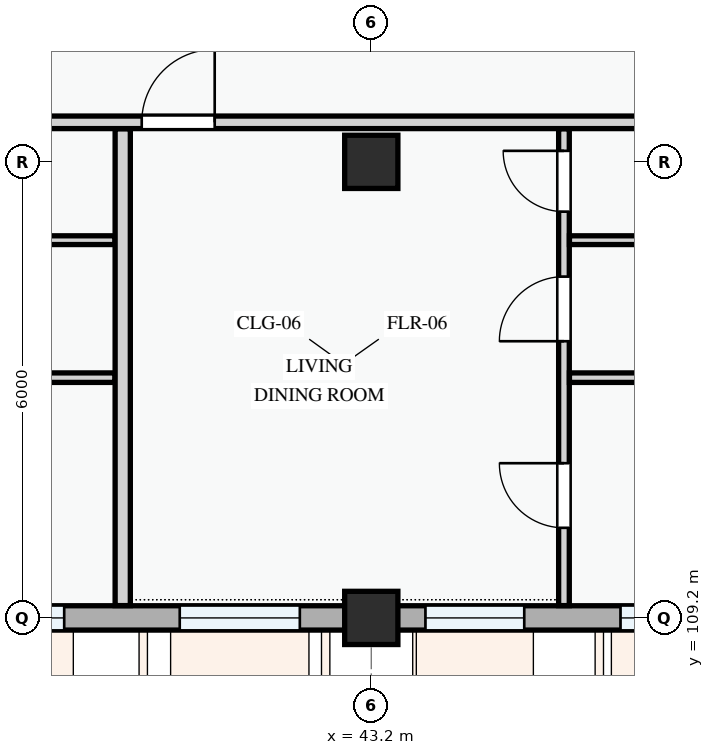
"""IFC4 building model, lengths in metres.
Left out: names, types, materials, properties, quantities, classifications, styles, units other than length and angle.
Written with IfcOpenShell. Run it as: python <this file> out.ifc"""

import sys

from ifc_helpers import new_model, si_unit, direction, frame, frame_2d, origin, origin_2d, place, context, subcontext, project, spatial, rectangle, extrude, element, fill, save


model = new_model("IFC4")
c1 = context("Model", 3, precision=1e-05, world=origin(), true_north=direction((0.0, 1.0)))
c2 = subcontext(c1, "Body", "Model", "MODEL_VIEW")
j1 = project(units=[si_unit("LENGTHUNIT", "METRE"), si_unit("PLANEANGLEUNIT", "RADIAN")], contexts=[c1])
p1 = place(None, origin())
s1 = spatial("IfcSite", under=j1, at=p1, CompositionType="ELEMENT")
p2 = place(p1, origin())
s2 = spatial("IfcBuilding", under=s1, at=p2, CompositionType="ELEMENT")
p3 = place(p2, frame((0.0, 0.0, 21.3)))
s3 = spatial("IfcBuildingStorey", under=s2, at=p3, CompositionType="ELEMENT", Elevation=21.3)
for number, where, z_axis, x_axis in (
    (1, (43.2, 109.2, 0.0), (0.0, 0.0, 1.0), (1.0, 0.0, 0.0)),
    (2, (43.2, 115.2, 0.0), (0.0, 0.0, 1.0), (1.0, 0.0, 0.0)),
):
    element("IfcColumn", number, at=place(p3, frame(where, z_axis=z_axis, x_axis=x_axis)), inside=s3, PredefinedType="COLUMN", context=c2, shape_type="SweptSolid", body=[
        extrude(rectangle(XDim=0.7, YDim=0.7, at=origin_2d()), origin(), (0.0, 0.0, 1.0), 3.3),
    ])
p4 = place(p3, frame((37.2, 109.2, 0.0), z_axis=(0.0, 0.0, 1.0), x_axis=(1.0, 0.0, 0.0)))
e3 = element("IfcWall", 3, at=p4, inside=s3, PredefinedType="STANDARD", context=c2, shape_type="SweptSolid", body=[
    extrude(rectangle(XDim=6.0, YDim=0.32, at=frame_2d((3.0, 0.0))), origin(), (0.0, 0.0, 1.0), 2.475),
])
p5 = place(p4, frame((0.96, 0.0, 0.78)))
e4 = element("IfcOpeningElement", 4, at=p5, cuts=e3, PredefinedType="OPENING", context=c2, shape_type="SweptSolid", body=[
    extrude(rectangle(XDim=1.0, YDim=1.25, at=frame_2d((0.5, 0.625))), frame((0.0, 0.17, 0.0), z_axis=(0.0, -1.0, 0.0), x_axis=(1.0, 0.0, 0.0)), (0.0, 0.0, 1.0), 0.34),
])
p6 = place(p4, frame((3.48, 0.0, 0.78)))
e5 = element("IfcOpeningElement", 5, at=p6, cuts=e3, PredefinedType="OPENING", context=c2, shape_type="SweptSolid", body=[
    extrude(rectangle(XDim=1.58, YDim=1.48, at=frame_2d((0.79, 0.74))), frame((0.0, 0.17, 0.0), z_axis=(0.0, -1.0, 0.0), x_axis=(1.0, 0.0, 0.0)), (0.0, 0.0, 1.0), 0.34),
])
p7 = place(p3, frame((43.2, 109.2, 0.0), z_axis=(0.0, 0.0, 1.0), x_axis=(1.0, 0.0, 0.0)))
e6 = element("IfcWall", 6, at=p7, inside=s3, PredefinedType="STANDARD", context=c2, shape_type="SweptSolid", body=[
    extrude(rectangle(XDim=8.4, YDim=0.32, at=frame_2d((4.2, 0.0))), origin(), (0.0, 0.0, 1.0), 2.375),
])
p8 = place(p7, frame((0.712, 0.0, 0.78)))
e7 = element("IfcOpeningElement", 7, at=p8, cuts=e6, PredefinedType="OPENING", context=c2, shape_type="SweptSolid", body=[
    extrude(rectangle(XDim=1.3, YDim=1.4, at=frame_2d((0.65, 0.7))), frame((0.0, 0.17, 0.0), z_axis=(0.0, -1.0, 0.0), x_axis=(1.0, 0.0, 0.0)), (0.0, 0.0, 1.0), 0.34),
])
p9 = place(p7, frame((3.279, 0.0, 0.78)))
e8 = element("IfcOpeningElement", 8, at=p9, cuts=e6, PredefinedType="OPENING", context=c2, shape_type="SweptSolid", body=[
    extrude(rectangle(XDim=1.42, YDim=1.38, at=frame_2d((0.71, 0.69))), frame((0.0, 0.17, 0.0), z_axis=(0.0, -1.0, 0.0), x_axis=(1.0, 0.0, 0.0)), (0.0, 0.0, 1.0), 0.34),
])
p10 = place(p7, frame((5.796, 0.0, 0.78)))
e9 = element("IfcOpeningElement", 9, at=p10, cuts=e6, PredefinedType="OPENING", context=c2, shape_type="SweptSolid", body=[
    extrude(rectangle(XDim=1.92, YDim=1.44, at=frame_2d((0.96, 0.72))), frame((0.0, 0.17, 0.0), z_axis=(0.0, -1.0, 0.0), x_axis=(1.0, 0.0, 0.0)), (0.0, 0.0, 1.0), 0.34),
])
p11 = place(p3, frame((35.507, 112.361, 0.0), z_axis=(0.0, 0.0, 1.0), x_axis=(1.0, 0.0, 0.0)))
e10 = element("IfcWall", 10, at=p11, inside=s3, PredefinedType="PARTITIONING", context=c2, shape_type="SweptSolid", body=[
    extrude(rectangle(XDim=4.321, YDim=0.125, at=frame_2d((2.16, 0.0))), origin(), (0.0, 0.0, 1.0), 3.0),
])
p12 = place(p3, frame((35.507, 114.17, 0.0), z_axis=(0.0, 0.0, 1.0), x_axis=(1.0, 0.0, 0.0)))
e11 = element("IfcWall", 11, at=p12, inside=s3, PredefinedType="PARTITIONING", context=c2, shape_type="SweptSolid", body=[
    extrude(rectangle(XDim=4.321, YDim=0.115, at=frame_2d((2.16, 0.0))), origin(), (0.0, 0.0, 1.0), 3.0),
])
p13 = place(p3, frame((45.735, 109.362, 0.0), z_axis=(0.0, 0.0, 1.0), x_axis=(0.0, 1.0, 0.0)))
e12 = element("IfcWall", 12, at=p13, inside=s3, PredefinedType="PARTITIONING", context=c2, shape_type="SweptSolid", body=[
    extrude(rectangle(XDim=6.273, YDim=0.14, at=frame_2d((3.137, 0.0))), origin(), (0.0, 0.0, 1.0), 3.0),
])
p14 = place(p13, frame((1.023, 0.0, 0.0)))
e13 = element("IfcOpeningElement", 13, at=p14, cuts=e12, PredefinedType="OPENING", context=c2, shape_type="SweptSolid", body=[
    extrude(rectangle(XDim=0.85, YDim=2.1, at=frame_2d((0.425, 1.05))), frame((0.0, 0.08, 0.0), z_axis=(0.0, -1.0, 0.0), x_axis=(1.0, 0.0, 0.0)), (0.0, 0.0, 1.0), 0.16),
])
p15 = place(p13, frame((3.478, 0.0, 0.0)))
e14 = element("IfcOpeningElement", 14, at=p15, cuts=e12, PredefinedType="OPENING", context=c2, shape_type="SweptSolid", body=[
    extrude(rectangle(XDim=0.85, YDim=2.1, at=frame_2d((0.425, 1.05))), frame((0.0, 0.08, 0.0), z_axis=(0.0, -1.0, 0.0), x_axis=(1.0, 0.0, 0.0)), (0.0, 0.0, 1.0), 0.16),
])
p16 = place(p13, frame((5.183, 0.0, 0.0)))
e15 = element("IfcOpeningElement", 15, at=p16, cuts=e12, PredefinedType="OPENING", context=c2, shape_type="SweptSolid", body=[
    extrude(rectangle(XDim=0.8, YDim=2.1, at=frame_2d((0.4, 1.05))), frame((0.0, 0.08, 0.0), z_axis=(0.0, -1.0, 0.0), x_axis=(1.0, 0.0, 0.0)), (0.0, 0.0, 1.0), 0.16),
])
p17 = place(p3, frame((45.807, 112.361, 0.0), z_axis=(0.0, 0.0, 1.0), x_axis=(1.0, 0.0, 0.0)))
e16 = element("IfcWall", 16, at=p17, inside=s3, PredefinedType="PARTITIONING", context=c2, shape_type="SweptSolid", body=[
    extrude(rectangle(XDim=5.631, YDim=0.125, at=frame_2d((2.815, 0.0))), origin(), (0.0, 0.0, 1.0), 3.0),
])
p18 = place(p3, frame((45.807, 114.17, 0.0), z_axis=(0.0, 0.0, 1.0), x_axis=(1.0, 0.0, 0.0)))
e17 = element("IfcWall", 17, at=p18, inside=s3, PredefinedType="PARTITIONING", context=c2, shape_type="SweptSolid", body=[
    extrude(rectangle(XDim=5.631, YDim=0.115, at=frame_2d((2.815, 0.0))), origin(), (0.0, 0.0, 1.0), 3.0),
])
p19 = place(p3, frame((39.93, 109.362, 0.0), z_axis=(0.0, 0.0, 1.0), x_axis=(0.0, 1.0, 0.0)))
e18 = element("IfcWall", 18, at=p19, inside=s3, PredefinedType="PARTITIONING", context=c2, shape_type="SweptSolid", body=[
    extrude(rectangle(XDim=6.273, YDim=0.2, at=frame_2d((3.137, 0.0))), origin(), (0.0, 0.0, 1.0), 3.0),
])
p20 = place(p3, frame((25.15, 115.72, 0.0), z_axis=(0.0, 0.0, 1.0), x_axis=(1.0, 0.0, 0.0)))
e19 = element("IfcWall", 19, at=p20, inside=s3, PredefinedType="PARTITIONING", context=c2, shape_type="SweptSolid", body=[
    extrude(rectangle(XDim=26.288, YDim=0.165, at=frame_2d((13.144, 0.0))), origin(), (0.0, 0.0, 1.0), 3.0),
])
p21 = place(p20, frame((0.25, 0.0, 0.0)))
e20 = element("IfcOpeningElement", 20, at=p21, cuts=e19, PredefinedType="OPENING", context=c2, shape_type="SweptSolid", body=[
    extrude(rectangle(XDim=0.92, YDim=2.1, at=frame_2d((0.46, 1.05))), frame((0.0, 0.093, 0.0), z_axis=(0.0, -1.0, 0.0), x_axis=(1.0, 0.0, 0.0)), (0.0, 0.0, 1.0), 0.185),
])
p22 = place(p20, frame((7.64, 0.0, 0.0)))
e21 = element("IfcOpeningElement", 21, at=p22, cuts=e19, PredefinedType="OPENING", context=c2, shape_type="SweptSolid", body=[
    extrude(rectangle(XDim=0.92, YDim=2.1, at=frame_2d((0.46, 1.05))), frame((0.0, 0.093, 0.0), z_axis=(0.0, -1.0, 0.0), x_axis=(1.0, 0.0, 0.0)), (0.0, 0.0, 1.0), 0.185),
])
p23 = place(p20, frame((15.03, 0.0, 0.0)))
e22 = element("IfcOpeningElement", 22, at=p23, cuts=e19, PredefinedType="OPENING", context=c2, shape_type="SweptSolid", body=[
    extrude(rectangle(XDim=0.96, YDim=2.12, at=frame_2d((0.48, 1.06))), frame((0.0, 0.093, 0.0), z_axis=(0.0, -1.0, 0.0), x_axis=(1.0, 0.0, 0.0)), (0.0, 0.0, 1.0), 0.185),
])
p24 = place(p5, origin())
e23 = element("IfcWindow", 23, at=p24, inside=s3, PartitioningType="SINGLE_PANEL", PredefinedType="WINDOW", context=c2, shape_type="SweptSolid", body=[
    extrude(rectangle(XDim=1.0, YDim=1.25, at=frame_2d((0.5, 0.625))), frame((0.0, 0.03, 0.0), z_axis=(0.0, -1.0, 0.0), x_axis=(1.0, 0.0, 0.0)), (0.0, 0.0, 1.0), 0.06),
])
fill(e4, e23)
p25 = place(p6, origin())
e24 = element("IfcWindow", 24, at=p25, inside=s3, PartitioningType="SINGLE_PANEL", PredefinedType="WINDOW", context=c2, shape_type="SweptSolid", body=[
    extrude(rectangle(XDim=1.58, YDim=1.48, at=frame_2d((0.79, 0.74))), frame((0.0, 0.03, 0.0), z_axis=(0.0, -1.0, 0.0), x_axis=(1.0, 0.0, 0.0)), (0.0, 0.0, 1.0), 0.06),
])
fill(e5, e24)
p26 = place(p8, origin())
e25 = element("IfcWindow", 25, at=p26, inside=s3, PartitioningType="SINGLE_PANEL", PredefinedType="WINDOW", context=c2, shape_type="SweptSolid", body=[
    extrude(rectangle(XDim=1.3, YDim=1.4, at=frame_2d((0.65, 0.7))), frame((0.0, 0.03, 0.0), z_axis=(0.0, -1.0, 0.0), x_axis=(1.0, 0.0, 0.0)), (0.0, 0.0, 1.0), 0.06),
])
fill(e7, e25)
p27 = place(p9, origin())
e26 = element("IfcWindow", 26, at=p27, inside=s3, PartitioningType="SINGLE_PANEL", PredefinedType="WINDOW", context=c2, shape_type="SweptSolid", body=[
    extrude(rectangle(XDim=1.42, YDim=1.38, at=frame_2d((0.71, 0.69))), frame((0.0, 0.03, 0.0), z_axis=(0.0, -1.0, 0.0), x_axis=(1.0, 0.0, 0.0)), (0.0, 0.0, 1.0), 0.06),
])
fill(e8, e26)
p28 = place(p14, origin())
e27 = element("IfcDoor", 27, at=p28, inside=s3, OperationType="SINGLE_SWING_RIGHT", PredefinedType="DOOR", context=c2, shape_type="SweptSolid", body=[
    extrude(rectangle(XDim=0.85, YDim=2.1, at=frame_2d((0.425, 1.05))), frame((0.0, 0.025, 0.0), z_axis=(0.0, -1.0, 0.0), x_axis=(1.0, 0.0, 0.0)), (0.0, 0.0, 1.0), 0.05),
])
fill(e13, e27)
p29 = place(p15, origin())
e28 = element("IfcDoor", 28, at=p29, inside=s3, OperationType="SINGLE_SWING_LEFT", PredefinedType="DOOR", context=c2, shape_type="SweptSolid", body=[
    extrude(rectangle(XDim=0.85, YDim=2.1, at=frame_2d((0.425, 1.05))), frame((0.0, 0.025, 0.0), z_axis=(0.0, -1.0, 0.0), x_axis=(1.0, 0.0, 0.0)), (0.0, 0.0, 1.0), 0.05),
])
fill(e14, e28)
p30 = place(p16, origin())
e29 = element("IfcDoor", 29, at=p30, inside=s3, OperationType="SINGLE_SWING_RIGHT", PredefinedType="DOOR", context=c2, shape_type="SweptSolid", body=[
    extrude(rectangle(XDim=0.8, YDim=2.1, at=frame_2d((0.4, 1.05))), frame((0.0, 0.025, 0.0), z_axis=(0.0, -1.0, 0.0), x_axis=(1.0, 0.0, 0.0)), (0.0, 0.0, 1.0), 0.05),
])
fill(e15, e29)
p31 = place(p23, origin())
e30 = element("IfcDoor", 30, at=p31, inside=s3, OperationType="SINGLE_SWING_RIGHT", PredefinedType="DOOR", context=c2, shape_type="SweptSolid", body=[
    extrude(rectangle(XDim=0.96, YDim=2.12, at=frame_2d((0.48, 1.06))), frame((0.0, 0.025, 0.0), z_axis=(0.0, -1.0, 0.0), x_axis=(1.0, 0.0, 0.0)), (0.0, 0.0, 1.0), 0.05),
])
fill(e22, e30)
save(model, sys.argv[1])
